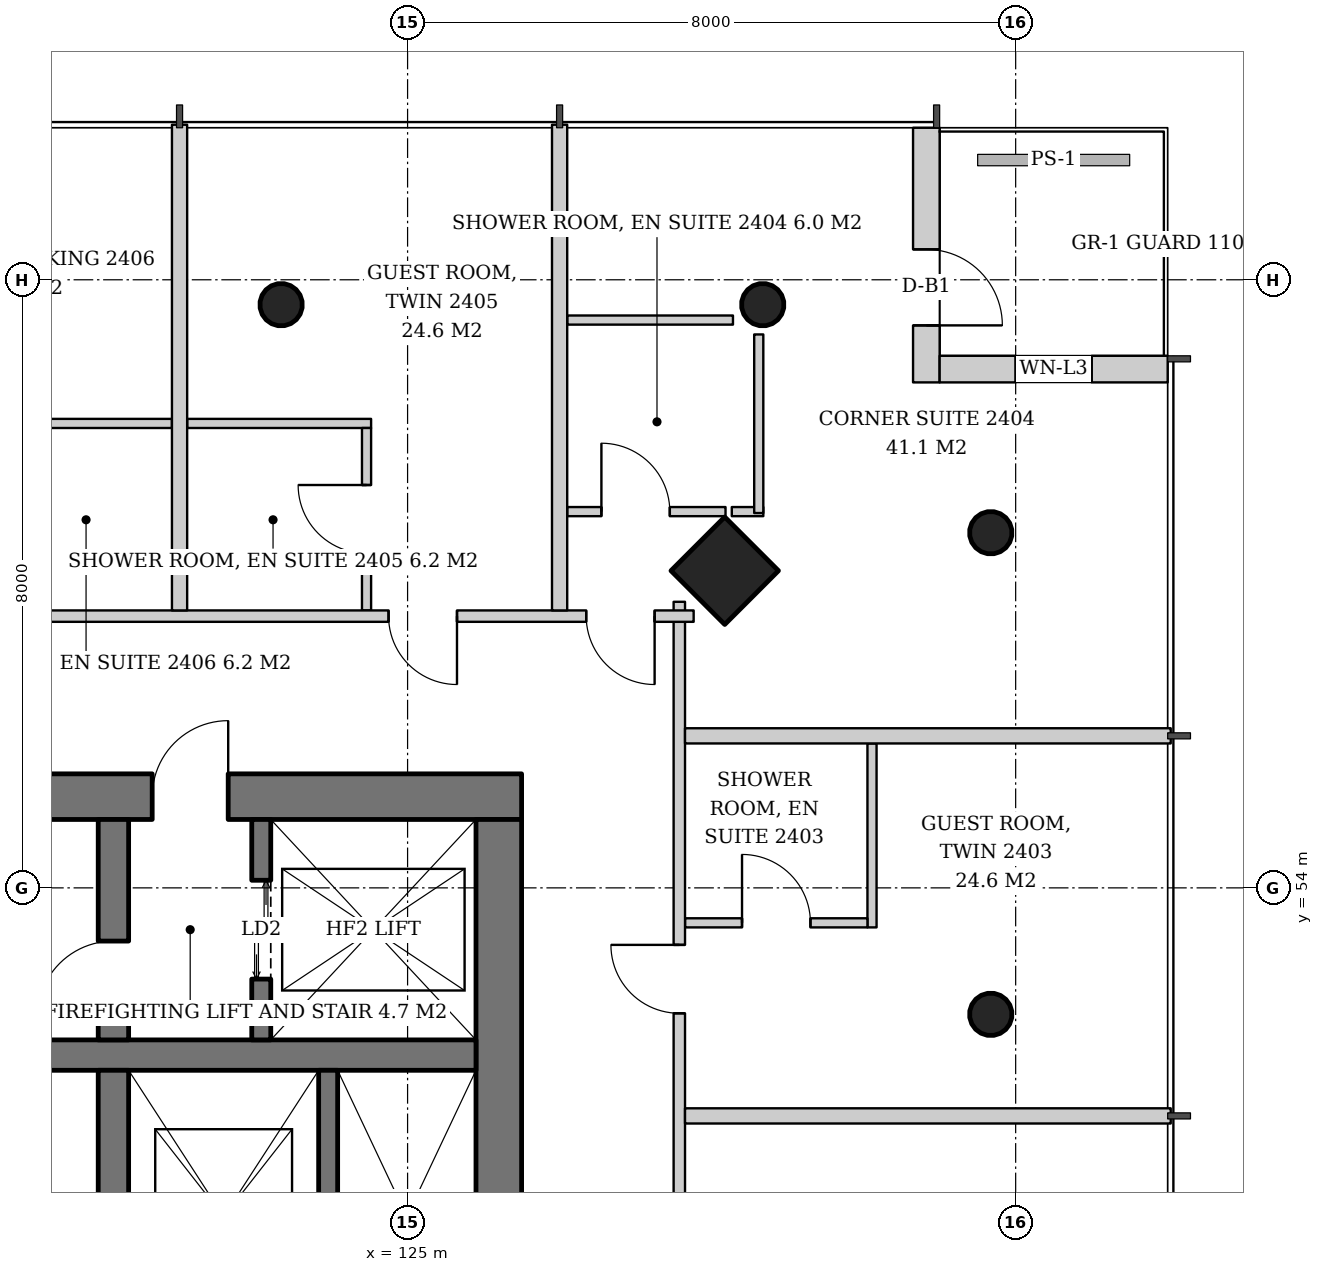
"""IFC4 building model, lengths in metres.
Left out: names, types, materials, properties, quantities, classifications, styles, units other than length and angle.
Written with IfcOpenShell. Run it as: python <this file> out.ifc"""

import sys

from ifc_helpers import new_model, si_unit, direction, frame, frame_2d, origin, origin_2d, place, context, subcontext, project, spatial, rectangle, hollow_circle, extrude, element, fill, save


model = new_model("IFC4")
c1 = context("Model", 3, precision=1e-05, world=origin(), true_north=direction((0.0, 1.0)))
c2 = subcontext(c1, "Body", "Model", "MODEL_VIEW")
j1 = project(units=[si_unit("LENGTHUNIT", "METRE"), si_unit("PLANEANGLEUNIT", "RADIAN")], contexts=[c1])
p1 = place(None, origin())
s1 = spatial("IfcSite", under=j1, at=p1, CompositionType="ELEMENT")
p2 = place(p1, origin())
s2 = spatial("IfcBuilding", under=s1, at=p2, CompositionType="ELEMENT")
p3 = place(p2, frame((0.0, 0.0, 97.0)))
s3 = spatial("IfcBuildingStorey", under=s2, at=p3, CompositionType="ELEMENT", Elevation=97.0)
p4 = place(p3, frame((129.224, 58.224, 0.0), z_axis=(-0.043029647111, -0.043029647111, 0.998146732169), x_axis=(0.707106781187, -0.707106781187, 0.0)))
e1 = element("IfcColumn", 1, at=p4, inside=s3, PredefinedType="COLUMN", context=c2, shape_type="SweptSolid", body=[
    extrude(rectangle(XDim=1.0, YDim=1.0, at=origin_2d()), origin(), (0.0, 0.0, 1.0), 3.807),
])
p5 = place(p3, frame((132.724, 58.724, 0.0), z_axis=(-0.043029647111, -0.043029647111, 0.998146732169), x_axis=(0.707106781187, -0.707106781187, 0.0)))
e2 = element("IfcColumn", 2, at=p5, inside=s3, PredefinedType="COLUMN", context=c2, shape_type="SweptSolid", body=[
    extrude(hollow_circle(Radius=0.28, WallThickness=0.02, at=origin_2d()), origin(), (0.0, 0.0, 1.0), 3.807),
])
p6 = place(p3, frame((132.724, 52.362, 0.0), z_axis=(-0.043059584825, -0.021497706284, 0.998841188968), x_axis=(0.446680166538, -0.894693706707, 0.0)))
e3 = element("IfcColumn", 3, at=p6, inside=s3, PredefinedType="COLUMN", context=c2, shape_type="SweptSolid", body=[
    extrude(hollow_circle(Radius=0.28, WallThickness=0.02, at=origin_2d()), origin(), (0.0, 0.0, 1.0), 3.804),
])
p7 = place(p3, frame((129.724, 61.724, 0.0), z_axis=(-0.043029647111, -0.043029647111, 0.998146732169), x_axis=(0.707106781187, -0.707106781187, 0.0)))
e4 = element("IfcColumn", 4, at=p7, inside=s3, PredefinedType="COLUMN", context=c2, shape_type="SweptSolid", body=[
    extrude(hollow_circle(Radius=0.28, WallThickness=0.02, at=origin_2d()), origin(), (0.0, 0.0, 1.0), 3.807),
])
p8 = place(p3, frame((123.362, 61.724, 0.0), z_axis=(-0.021497706284, -0.043059584825, 0.998841188968), x_axis=(0.894693706707, -0.446680166538, 0.0)))
e5 = element("IfcColumn", 5, at=p8, inside=s3, PredefinedType="COLUMN", context=c2, shape_type="SweptSolid", body=[
    extrude(hollow_circle(Radius=0.28, WallThickness=0.02, at=origin_2d()), origin(), (0.0, 0.0, 1.0), 3.804),
])
p9 = place(p3, frame((107.5, 55.2, 0.0), z_axis=(0.0, 0.0, 1.0), x_axis=(1.0, 0.0, 0.0)))
e6 = element("IfcWall", 6, at=p9, inside=s3, PredefinedType="SHEAR", context=c2, shape_type="SweptSolid", body=[
    extrude(rectangle(XDim=19.0, YDim=0.6, at=frame_2d((9.5, 0.0))), origin(), (0.0, 0.0, 1.0), 3.8),
])
p10 = place(p9, frame((14.14, 0.0, 0.0)))
e7 = element("IfcOpeningElement", 7, at=p10, cuts=e6, PredefinedType="OPENING", context=c2, shape_type="SweptSolid", body=[
    extrude(rectangle(XDim=1.0, YDim=2.1, at=frame_2d((0.5, 1.05))), frame((0.0, 0.31, 0.0), z_axis=(0.0, -1.0, 0.0), x_axis=(1.0, 0.0, 0.0)), (0.0, 0.0, 1.0), 0.62),
])
p11 = place(p9, frame((2.425, 0.0, 0.0)))
e8 = element("IfcOpeningElement", 8, at=p11, cuts=e6, PredefinedType="OPENING", context=c2, shape_type="SweptSolid", body=[
    extrude(rectangle(XDim=1.0, YDim=2.1, at=frame_2d((0.5, 1.05))), frame((0.0, 0.31, 0.0), z_axis=(0.0, -1.0, 0.0), x_axis=(1.0, 0.0, 0.0)), (0.0, 0.0, 1.0), 0.62),
])
p12 = place(p3, frame((126.2, 37.1, 0.0), z_axis=(0.0, 0.0, 1.0), x_axis=(0.0, 1.0, 0.0)))
e9 = element("IfcWall", 9, at=p12, inside=s3, PredefinedType="SHEAR", context=c2, shape_type="SweptSolid", body=[
    extrude(rectangle(XDim=17.8, YDim=0.6, at=frame_2d((8.9, 0.0))), origin(), (0.0, 0.0, 1.0), 3.8),
])
p13 = place(p12, frame((8.0, 0.0, 0.0)))
e10 = element("IfcOpeningElement", 10, at=p13, cuts=e9, PredefinedType="OPENING", context=c2, shape_type="SweptSolid", body=[
    extrude(rectangle(XDim=1.8, YDim=2.4, at=frame_2d((0.9, 1.2))), frame((0.0, 0.31, 0.0), z_axis=(0.0, -1.0, 0.0), x_axis=(1.0, 0.0, 0.0)), (0.0, 0.0, 1.0), 0.62),
])
p14 = place(p3, frame((108.1, 51.8, 0.0), z_axis=(0.0, 0.0, 1.0), x_axis=(1.0, 0.0, 0.0)))
e11 = element("IfcWall", 11, at=p14, inside=s3, PredefinedType="SHEAR", context=c2, shape_type="SweptSolid", body=[
    extrude(rectangle(XDim=17.8, YDim=0.4, at=frame_2d((8.9, 0.0))), origin(), (0.0, 0.0, 1.0), 3.8),
])
p15 = place(p3, frame((121.13, 40.4, 0.0), z_axis=(0.0, 0.0, 1.0), x_axis=(0.0, 1.0, 0.0)))
e12 = element("IfcWall", 12, at=p15, inside=s3, PredefinedType="SHEAR", context=c2, shape_type="SweptSolid", body=[
    extrude(rectangle(XDim=11.2, YDim=0.4, at=frame_2d((5.6, 0.0))), origin(), (0.0, 0.0, 1.0), 3.8),
])
p16 = place(p3, frame((121.13, 52.0, 0.0), z_axis=(0.0, 0.0, 1.0), x_axis=(0.0, 1.0, 0.0)))
e13 = element("IfcWall", 13, at=p16, inside=s3, PredefinedType="SHEAR", context=c2, shape_type="SweptSolid", body=[
    extrude(rectangle(XDim=2.9, YDim=0.4, at=frame_2d((1.45, 0.0))), origin(), (0.0, 0.0, 1.0), 3.8),
])
p17 = place(p16, frame((0.3, 0.0, 0.0)))
e14 = element("IfcOpeningElement", 14, at=p17, cuts=e13, PredefinedType="OPENING", context=c2, shape_type="SweptSolid", body=[
    extrude(rectangle(XDim=1.0, YDim=2.1, at=frame_2d((0.5, 1.05))), frame((0.0, 0.21, 0.0), z_axis=(0.0, -1.0, 0.0), x_axis=(1.0, 0.0, 0.0)), (0.0, 0.0, 1.0), 0.42),
])
p18 = place(p3, frame((131.825, 64.0, 0.0), z_axis=(0.0, 0.0, 1.0), x_axis=(0.0, -1.0, 0.0)))
e15 = element("IfcWall", 15, at=p18, inside=s3, PredefinedType="SOLIDWALL", context=c2, shape_type="SweptSolid", body=[
    extrude(rectangle(XDim=3.35, YDim=0.35, at=frame_2d((1.675, 0.0))), origin(), (0.0, 0.0, 1.0), 3.6),
])
p19 = place(p18, frame((1.6, 0.0, 0.0)))
e16 = element("IfcOpeningElement", 16, at=p19, cuts=e15, PredefinedType="OPENING", context=c2, shape_type="SweptSolid", body=[
    extrude(rectangle(XDim=1.0, YDim=2.4, at=frame_2d((0.5, 1.2))), frame((0.0, 0.185, 0.0), z_axis=(0.0, -1.0, 0.0), x_axis=(1.0, 0.0, 0.0)), (0.0, 0.0, 1.0), 0.37),
])
p20 = place(p3, frame((132.0, 60.825, 0.0), z_axis=(0.0, 0.0, 1.0), x_axis=(1.0, 0.0, 0.0)))
e17 = element("IfcWall", 17, at=p20, inside=s3, PredefinedType="SOLIDWALL", context=c2, shape_type="SweptSolid", body=[
    extrude(rectangle(XDim=3.0, YDim=0.35, at=frame_2d((1.5, 0.0))), origin(), (0.0, 0.0, 1.0), 3.6),
])
p21 = place(p20, frame((1.0, 0.0, 0.9)))
e18 = element("IfcOpeningElement", 18, at=p21, cuts=e17, PredefinedType="OPENING", context=c2, shape_type="SweptSolid", body=[
    extrude(rectangle(XDim=1.0, YDim=2.4, at=frame_2d((0.5, 1.2))), frame((0.0, 0.185, 0.0), z_axis=(0.0, -1.0, 0.0), x_axis=(1.0, 0.0, 0.0)), (0.0, 0.0, 1.0), 0.37),
])
p22 = place(p3, frame((123.075, 52.0, 0.0), z_axis=(0.0, 0.0, 1.0), x_axis=(0.0, 1.0, 0.0)))
e19 = element("IfcWall", 19, at=p22, inside=s3, PredefinedType="SHEAR", context=c2, shape_type="SweptSolid", body=[
    extrude(rectangle(XDim=2.9, YDim=0.25, at=frame_2d((1.45, 0.0))), origin(), (0.0, 0.0, 1.0), 3.8),
])
p23 = place(p22, frame((0.8, 0.0, 0.0)))
e20 = element("IfcOpeningElement", 20, at=p23, cuts=e19, PredefinedType="OPENING", context=c2, shape_type="SweptSolid", body=[
    extrude(rectangle(XDim=1.3, YDim=2.2, at=frame_2d((0.65, 1.1))), frame((0.0, 0.135, 0.0), z_axis=(0.0, -1.0, 0.0), x_axis=(1.0, 0.0, 0.0)), (0.0, 0.0, 1.0), 0.27),
])
p24 = place(p3, frame((123.955, 47.75, 0.0), z_axis=(0.0, 0.0, 1.0), x_axis=(0.0, 1.0, 0.0)))
e21 = element("IfcWall", 21, at=p24, inside=s3, PredefinedType="SHEAR", context=c2, shape_type="SweptSolid", body=[
    extrude(rectangle(XDim=3.85, YDim=0.25, at=frame_2d((1.925, 0.0))), origin(), (0.0, 0.0, 1.0), 3.8),
])
p25 = place(p3, frame((131.11, 53.48, 0.0), z_axis=(0.0, 0.0, 1.0), x_axis=(0.0, 1.0, 0.0)))
e22 = element("IfcWall", 22, at=p25, inside=s3, PredefinedType="PARTITIONING", context=c2, shape_type="SweptSolid", body=[
    extrude(rectangle(XDim=2.42, YDim=0.12, at=frame_2d((1.21, 0.0))), origin(), (0.0, 0.0, 1.0), 3.6),
])
p26 = place(p3, frame((128.65, 53.54, 0.0), z_axis=(0.0, 0.0, 1.0), x_axis=(1.0, 0.0, 0.0)))
e23 = element("IfcWall", 23, at=p26, inside=s3, PredefinedType="PARTITIONING", context=c2, shape_type="SweptSolid", body=[
    extrude(rectangle(XDim=2.4, YDim=0.12, at=frame_2d((1.2, 0.0))), origin(), (0.0, 0.0, 1.0), 3.6),
])
p27 = place(p26, frame((0.75, 0.0, 0.0)))
e24 = element("IfcOpeningElement", 24, at=p27, cuts=e23, PredefinedType="OPENING", context=c2, shape_type="SweptSolid", body=[
    extrude(rectangle(XDim=0.9, YDim=2.1, at=frame_2d((0.45, 1.05))), frame((0.0, 0.07, 0.0), z_axis=(0.0, -1.0, 0.0), x_axis=(1.0, 0.0, 0.0)), (0.0, 0.0, 1.0), 0.14),
])
p28 = place(p3, frame((128.575, 34.236, 0.0), z_axis=(0.0, 0.0, 1.0), x_axis=(0.0, 1.0, 0.0)))
e25 = element("IfcWall", 25, at=p28, inside=s3, PredefinedType="PARTITIONING", context=c2, shape_type="SweptSolid", body=[
    extrude(rectangle(XDim=23.527, YDim=0.15, at=frame_2d((11.764, 0.0))), origin(), (0.0, 0.0, 1.0), 2.9),
])
p29 = place(p28, frame((0.514, 0.0, 0.0)))
e26 = element("IfcOpeningElement", 26, at=p29, cuts=e25, PredefinedType="OPENING", context=c2, shape_type="SweptSolid", body=[
    extrude(rectangle(XDim=0.9, YDim=2.1, at=frame_2d((0.45, 1.05))), frame((0.0, 0.085, 0.0), z_axis=(0.0, -1.0, 0.0), x_axis=(1.0, 0.0, 0.0)), (0.0, 0.0, 1.0), 0.17),
])
p30 = place(p28, frame((9.514, 0.0, 0.0)))
e27 = element("IfcOpeningElement", 27, at=p30, cuts=e25, PredefinedType="OPENING", context=c2, shape_type="SweptSolid", body=[
    extrude(rectangle(XDim=0.9, YDim=2.1, at=frame_2d((0.45, 1.05))), frame((0.0, 0.085, 0.0), z_axis=(0.0, -1.0, 0.0), x_axis=(1.0, 0.0, 0.0)), (0.0, 0.0, 1.0), 0.17),
])
p31 = place(p28, frame((18.114, 0.0, 0.0)))
e28 = element("IfcOpeningElement", 28, at=p31, cuts=e25, PredefinedType="OPENING", context=c2, shape_type="SweptSolid", body=[
    extrude(rectangle(XDim=0.9, YDim=2.1, at=frame_2d((0.45, 1.05))), frame((0.0, 0.085, 0.0), z_axis=(0.0, -1.0, 0.0), x_axis=(1.0, 0.0, 0.0)), (0.0, 0.0, 1.0), 0.17),
])
for number, where, z_axis, x_axis in (
    (29, (128.65, 51.0, 0.0), (0.0, 0.0, 1.0), (1.0, 0.0, 0.0)),
    (30, (128.65, 56.0, 0.0), (0.0, 0.0, 1.0), (1.0, 0.0, 0.0)),
):
    element("IfcWall", number, at=place(p3, frame(where, z_axis=z_axis, x_axis=x_axis)), inside=s3, PredefinedType="PARTITIONING", context=c2, shape_type="SweptSolid", body=[
        extrude(rectangle(XDim=6.39, YDim=0.2, at=frame_2d((3.195, 0.0))), origin(), (0.0, 0.0, 1.0), 3.2),
    ])
p32 = place(p3, frame((127.1, 58.95, 0.0), z_axis=(0.0, 0.0, 1.0), x_axis=(1.0, 0.0, 0.0)))
e31 = element("IfcWall", 31, at=p32, inside=s3, PredefinedType="PARTITIONING", context=c2, shape_type="SweptSolid", body=[
    extrude(rectangle(XDim=2.083, YDim=0.12, at=frame_2d((1.042, 0.0))), origin(), (0.0, 0.0, 1.0), 3.2),
])
p33 = place(p32, frame((0.45, 0.0, 0.0)))
e32 = element("IfcOpeningElement", 32, at=p33, cuts=e31, PredefinedType="OPENING", context=c2, shape_type="SweptSolid", body=[
    extrude(rectangle(XDim=0.9, YDim=2.1, at=frame_2d((0.45, 1.05))), frame((0.0, 0.07, 0.0), z_axis=(0.0, -1.0, 0.0), x_axis=(1.0, 0.0, 0.0)), (0.0, 0.0, 1.0), 0.14),
])
p34 = place(p3, frame((129.265, 58.95, 0.0), z_axis=(0.0, 0.0, 1.0), x_axis=(1.0, 0.0, 0.0)))
e33 = element("IfcWall", 33, at=p34, inside=s3, PredefinedType="PARTITIONING", context=c2, shape_type="SweptSolid", body=[
    extrude(rectangle(XDim=0.415, YDim=0.12, at=frame_2d((0.207, 0.0))), origin(), (0.0, 0.0, 1.0), 3.2),
])
p35 = place(p3, frame((127.1, 61.47, 0.0), z_axis=(0.0, 0.0, 1.0), x_axis=(1.0, 0.0, 0.0)))
e34 = element("IfcWall", 34, at=p35, inside=s3, PredefinedType="PARTITIONING", context=c2, shape_type="SweptSolid", body=[
    extrude(rectangle(XDim=2.181, YDim=0.12, at=frame_2d((1.09, 0.0))), origin(), (0.0, 0.0, 1.0), 3.2),
])
p36 = place(p3, frame((129.62, 58.931, 0.0), z_axis=(0.0, 0.0, 1.0), x_axis=(0.0, 1.0, 0.0)))
e35 = element("IfcWall", 35, at=p36, inside=s3, PredefinedType="PARTITIONING", context=c2, shape_type="SweptSolid", body=[
    extrude(rectangle(XDim=2.35, YDim=0.12, at=frame_2d((1.175, 0.0))), origin(), (0.0, 0.0, 1.0), 3.2),
])
p37 = place(p3, frame((124.52, 60.11, 0.0), z_axis=(0.0, 0.0, 1.0), x_axis=(-1.0, 0.0, 0.0)))
e36 = element("IfcWall", 36, at=p37, inside=s3, PredefinedType="PARTITIONING", context=c2, shape_type="SweptSolid", body=[
    extrude(rectangle(XDim=2.42, YDim=0.12, at=frame_2d((1.21, 0.0))), origin(), (0.0, 0.0, 1.0), 3.0),
])
p38 = place(p3, frame((124.46, 57.65, 0.0), z_axis=(0.0, 0.0, 1.0), x_axis=(0.0, 1.0, 0.0)))
e37 = element("IfcWall", 37, at=p38, inside=s3, PredefinedType="PARTITIONING", context=c2, shape_type="SweptSolid", body=[
    extrude(rectangle(XDim=2.4, YDim=0.12, at=frame_2d((1.2, 0.0))), origin(), (0.0, 0.0, 1.0), 3.6),
])
p39 = place(p38, frame((0.75, 0.0, 0.0)))
e38 = element("IfcOpeningElement", 38, at=p39, cuts=e37, PredefinedType="OPENING", context=c2, shape_type="SweptSolid", body=[
    extrude(rectangle(XDim=0.9, YDim=2.1, at=frame_2d((0.45, 1.05))), frame((0.0, 0.07, 0.0), z_axis=(0.0, -1.0, 0.0), x_axis=(1.0, 0.0, 0.0)), (0.0, 0.0, 1.0), 0.14),
])
p40 = place(p3, frame((121.9, 60.11, 0.0), z_axis=(0.0, 0.0, 1.0), x_axis=(-1.0, 0.0, 0.0)))
e39 = element("IfcWall", 39, at=p40, inside=s3, PredefinedType="PARTITIONING", context=c2, shape_type="SweptSolid", body=[
    extrude(rectangle(XDim=2.42, YDim=0.12, at=frame_2d((1.21, 0.0))), origin(), (0.0, 0.0, 1.0), 3.6),
])
p41 = place(p3, frame((128.764, 57.575, 0.0), z_axis=(0.0, 0.0, 1.0), x_axis=(-1.0, 0.0, 0.0)))
e40 = element("IfcWall", 40, at=p41, inside=s3, PredefinedType="PARTITIONING", context=c2, shape_type="SweptSolid", body=[
    extrude(rectangle(XDim=23.527, YDim=0.15, at=frame_2d((11.764, 0.0))), origin(), (0.0, 0.0, 1.0), 2.9),
])
p42 = place(p41, frame((0.514, 0.0, 0.0)))
e41 = element("IfcOpeningElement", 41, at=p42, cuts=e40, PredefinedType="OPENING", context=c2, shape_type="SweptSolid", body=[
    extrude(rectangle(XDim=0.9, YDim=2.1, at=frame_2d((0.45, 1.05))), frame((0.0, 0.085, 0.0), z_axis=(0.0, -1.0, 0.0), x_axis=(1.0, 0.0, 0.0)), (0.0, 0.0, 1.0), 0.17),
])
p43 = place(p41, frame((3.114, 0.0, 0.0)))
e42 = element("IfcOpeningElement", 42, at=p43, cuts=e40, PredefinedType="OPENING", context=c2, shape_type="SweptSolid", body=[
    extrude(rectangle(XDim=0.9, YDim=2.1, at=frame_2d((0.45, 1.05))), frame((0.0, 0.085, 0.0), z_axis=(0.0, -1.0, 0.0), x_axis=(1.0, 0.0, 0.0)), (0.0, 0.0, 1.0), 0.17),
])
p44 = place(p41, frame((9.514, 0.0, 0.0)))
e43 = element("IfcOpeningElement", 43, at=p44, cuts=e40, PredefinedType="OPENING", context=c2, shape_type="SweptSolid", body=[
    extrude(rectangle(XDim=0.9, YDim=2.1, at=frame_2d((0.45, 1.05))), frame((0.0, 0.085, 0.0), z_axis=(0.0, -1.0, 0.0), x_axis=(1.0, 0.0, 0.0)), (0.0, 0.0, 1.0), 0.17),
])
p45 = place(p41, frame((13.114, 0.0, 0.0)))
e44 = element("IfcOpeningElement", 44, at=p45, cuts=e40, PredefinedType="OPENING", context=c2, shape_type="SweptSolid", body=[
    extrude(rectangle(XDim=0.9, YDim=2.1, at=frame_2d((0.45, 1.05))), frame((0.0, 0.085, 0.0), z_axis=(0.0, -1.0, 0.0), x_axis=(1.0, 0.0, 0.0)), (0.0, 0.0, 1.0), 0.17),
])
p46 = place(p41, frame((19.514, 0.0, 0.0)))
e45 = element("IfcOpeningElement", 45, at=p46, cuts=e40, PredefinedType="OPENING", context=c2, shape_type="SweptSolid", body=[
    extrude(rectangle(XDim=0.9, YDim=2.1, at=frame_2d((0.45, 1.05))), frame((0.0, 0.085, 0.0), z_axis=(0.0, -1.0, 0.0), x_axis=(1.0, 0.0, 0.0)), (0.0, 0.0, 1.0), 0.17),
])
p47 = place(p3, frame((127.0, 57.65, 0.0), z_axis=(0.0, 0.0, 1.0), x_axis=(0.0, 1.0, 0.0)))
e46 = element("IfcWall", 46, at=p47, inside=s3, PredefinedType="PARTITIONING", context=c2, shape_type="SweptSolid", body=[
    extrude(rectangle(XDim=6.39, YDim=0.2, at=frame_2d((3.195, 0.0))), origin(), (0.0, 0.0, 1.0), 3.2),
])
p48 = place(p3, frame((122.0, 57.65, 0.0), z_axis=(0.0, 0.0, 1.0), x_axis=(0.0, 1.0, 0.0)))
e47 = element("IfcWall", 47, at=p48, inside=s3, PredefinedType="PARTITIONING", context=c2, shape_type="SweptSolid", body=[
    extrude(rectangle(XDim=6.39, YDim=0.2, at=frame_2d((3.195, 0.0))), origin(), (0.0, 0.0, 1.0), 3.0),
])
p49 = place(p19, origin())
e48 = element("IfcDoor", 48, at=p49, inside=s3, OperationType="SINGLE_SWING_RIGHT", PredefinedType="DOOR", context=c2, shape_type="SweptSolid", body=[
    extrude(rectangle(XDim=1.0, YDim=2.4, at=frame_2d((0.5, 1.2))), frame((0.0, 0.025, 0.0), z_axis=(0.0, -1.0, 0.0), x_axis=(1.0, 0.0, 0.0)), (0.0, 0.0, 1.0), 0.05),
])
fill(e16, e48)
p50 = place(p21, origin())
e49 = element("IfcWindow", 49, at=p50, inside=s3, PartitioningType="SINGLE_PANEL", PredefinedType="WINDOW", context=c2, shape_type="SweptSolid", body=[
    extrude(rectangle(XDim=1.0, YDim=2.4, at=frame_2d((0.5, 1.2))), frame((0.0, 0.03, 0.0), z_axis=(0.0, -1.0, 0.0), x_axis=(1.0, 0.0, 0.0)), (0.0, 0.0, 1.0), 0.06),
])
fill(e18, e49)
p51 = place(p23, origin())
e50 = element("IfcDoor", 50, at=p51, inside=s3, OperationType="DOUBLE_DOOR_SLIDING", PredefinedType="DOOR", context=c2, shape_type="SweptSolid", body=[
    extrude(rectangle(XDim=1.3, YDim=2.2, at=frame_2d((0.65, 1.1))), frame((0.0, 0.025, 0.0), z_axis=(0.0, -1.0, 0.0), x_axis=(1.0, 0.0, 0.0)), (0.0, 0.0, 1.0), 0.05),
])
fill(e20, e50)
p52 = place(p17, origin())
e51 = element("IfcDoor", 51, at=p52, inside=s3, OperationType="SINGLE_SWING_LEFT", PredefinedType="DOOR", context=c2, shape_type="SweptSolid", body=[
    extrude(rectangle(XDim=1.0, YDim=2.1, at=frame_2d((0.5, 1.05))), frame((0.0, 0.025, 0.0), z_axis=(0.0, -1.0, 0.0), x_axis=(1.0, 0.0, 0.0)), (0.0, 0.0, 1.0), 0.05),
])
fill(e14, e51)
p53 = place(p10, origin())
e52 = element("IfcDoor", 52, at=p53, inside=s3, OperationType="SINGLE_SWING_RIGHT", PredefinedType="DOOR", context=c2, shape_type="SweptSolid", body=[
    extrude(rectangle(XDim=1.0, YDim=2.1, at=frame_2d((0.5, 1.05))), frame((0.0, 0.025, 0.0), z_axis=(0.0, -1.0, 0.0), x_axis=(1.0, 0.0, 0.0)), (0.0, 0.0, 1.0), 0.05),
])
fill(e7, e52)
p54 = place(p27, origin())
e53 = element("IfcDoor", 53, at=p54, inside=s3, OperationType="SINGLE_SWING_LEFT", PredefinedType="DOOR", context=c2, shape_type="SweptSolid", body=[
    extrude(rectangle(XDim=0.9, YDim=2.1, at=frame_2d((0.45, 1.05))), frame((0.0, 0.025, 0.0), z_axis=(0.0, -1.0, 0.0), x_axis=(1.0, 0.0, 0.0)), (0.0, 0.0, 1.0), 0.05),
])
fill(e24, e53)
p55 = place(p31, origin())
e54 = element("IfcDoor", 54, at=p55, inside=s3, OperationType="SINGLE_SWING_RIGHT", PredefinedType="DOOR", context=c2, shape_type="SweptSolid", body=[
    extrude(rectangle(XDim=0.9, YDim=2.1, at=frame_2d((0.45, 1.05))), frame((0.0, 0.025, 0.0), z_axis=(0.0, -1.0, 0.0), x_axis=(1.0, 0.0, 0.0)), (0.0, 0.0, 1.0), 0.05),
])
fill(e28, e54)
p56 = place(p33, origin())
e55 = element("IfcDoor", 55, at=p56, inside=s3, OperationType="SINGLE_SWING_LEFT", PredefinedType="DOOR", context=c2, shape_type="SweptSolid", body=[
    extrude(rectangle(XDim=0.9, YDim=2.1, at=frame_2d((0.45, 1.05))), frame((0.0, 0.025, 0.0), z_axis=(0.0, -1.0, 0.0), x_axis=(1.0, 0.0, 0.0)), (0.0, 0.0, 1.0), 0.05),
])
fill(e32, e55)
p57 = place(p39, origin())
e56 = element("IfcDoor", 56, at=p57, inside=s3, OperationType="SINGLE_SWING_RIGHT", PredefinedType="DOOR", context=c2, shape_type="SweptSolid", body=[
    extrude(rectangle(XDim=0.9, YDim=2.1, at=frame_2d((0.45, 1.05))), frame((0.0, 0.025, 0.0), z_axis=(0.0, -1.0, 0.0), x_axis=(1.0, 0.0, 0.0)), (0.0, 0.0, 1.0), 0.05),
])
fill(e38, e56)
p58 = place(p42, origin())
e57 = element("IfcDoor", 57, at=p58, inside=s3, OperationType="SINGLE_SWING_LEFT", PredefinedType="DOOR", context=c2, shape_type="SweptSolid", body=[
    extrude(rectangle(XDim=0.9, YDim=2.1, at=frame_2d((0.45, 1.05))), frame((0.0, 0.025, 0.0), z_axis=(0.0, -1.0, 0.0), x_axis=(1.0, 0.0, 0.0)), (0.0, 0.0, 1.0), 0.05),
])
fill(e41, e57)
p59 = place(p43, origin())
e58 = element("IfcDoor", 58, at=p59, inside=s3, OperationType="SINGLE_SWING_LEFT", PredefinedType="DOOR", context=c2, shape_type="SweptSolid", body=[
    extrude(rectangle(XDim=0.9, YDim=2.1, at=frame_2d((0.45, 1.05))), frame((0.0, 0.025, 0.0), z_axis=(0.0, -1.0, 0.0), x_axis=(1.0, 0.0, 0.0)), (0.0, 0.0, 1.0), 0.05),
])
fill(e42, e58)
save(model, sys.argv[1])
